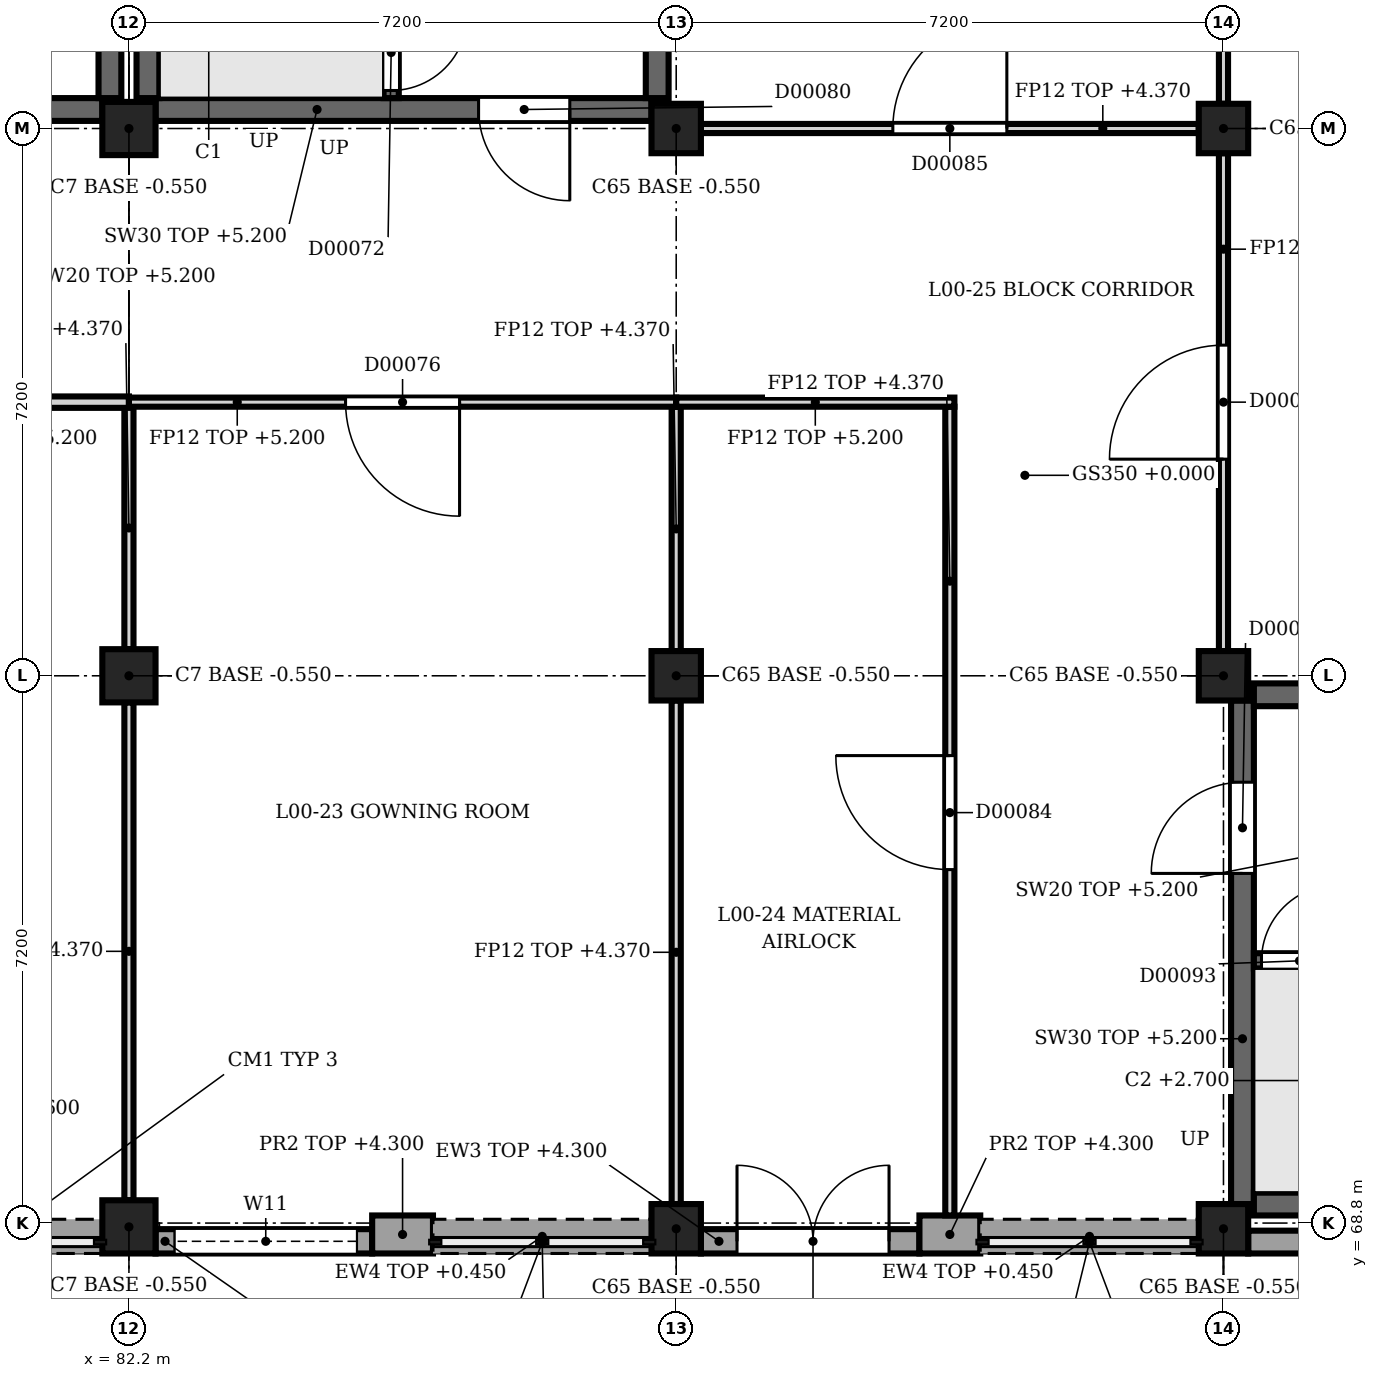
"""IFC4 building model, lengths in metres.
Left out: names, types, materials, properties, quantities, classifications, styles, units other than length and angle.
Written with IfcOpenShell. Run it as: python <this file> out.ifc"""

import sys

from ifc_helpers import new_model, si_unit, direction, frame, frame_2d, origin, origin_2d, place, context, subcontext, project, spatial, rectangle, extrude, element, fill, save


model = new_model("IFC4")
c1 = context("Model", 3, precision=1e-05, world=origin(), true_north=direction((0.0, 1.0)))
c2 = subcontext(c1, "Body", "Model", "MODEL_VIEW")
j1 = project(units=[si_unit("LENGTHUNIT", "METRE"), si_unit("PLANEANGLEUNIT", "RADIAN")], contexts=[c1])
p1 = place(None, origin())
s1 = spatial("IfcSite", under=j1, at=p1, CompositionType="ELEMENT")
p2 = place(p1, origin())
s2 = spatial("IfcBuilding", under=s1, at=p2, CompositionType="ELEMENT")
p3 = place(p2, origin())
s3 = spatial("IfcBuildingStorey", under=s2, at=p3, CompositionType="ELEMENT", Elevation=0.0)
for number, where, z_axis, x_axis in (
    (1, (82.2, 68.75, -0.55), (0.0, 0.0, 1.0), (1.0, 0.0, 0.0)),
    (2, (82.2, 76.0, -0.55), (0.0, 0.0, 1.0), (1.0, 0.0, 0.0)),
    (3, (82.2, 83.2, -0.55), (0.0, 0.0, 1.0), (1.0, 0.0, 0.0)),
):
    element("IfcColumn", number, at=place(p3, frame(where, z_axis=z_axis, x_axis=x_axis)), inside=s3, PredefinedType="COLUMN", context=c2, shape_type="SweptSolid", body=[
        extrude(rectangle(XDim=0.7, YDim=0.7, at=origin_2d()), origin(), (0.0, 0.0, 1.0), 5.95),
    ])
for number, where, z_axis, x_axis in (
    (4, (89.4, 68.725, -0.55), (0.0, 0.0, 1.0), (1.0, 0.0, 0.0)),
    (5, (89.4, 76.0, -0.55), (0.0, 0.0, 1.0), (1.0, 0.0, 0.0)),
    (6, (89.4, 83.2, -0.55), (0.0, 0.0, 1.0), (1.0, 0.0, 0.0)),
    (7, (96.6, 68.725, -0.55), (0.0, 0.0, 1.0), (1.0, 0.0, 0.0)),
    (8, (96.6, 76.0, -0.55), (0.0, 0.0, 1.0), (1.0, 0.0, 0.0)),
    (9, (96.6, 83.2, -0.55), (0.0, 0.0, 1.0), (1.0, 0.0, 0.0)),
):
    element("IfcColumn", number, at=place(p3, frame(where, z_axis=z_axis, x_axis=x_axis)), inside=s3, PredefinedType="COLUMN", context=c2, shape_type="SweptSolid", body=[
        extrude(rectangle(XDim=0.65, YDim=0.65, at=origin_2d()), origin(), (0.0, 0.0, 1.0), 5.95),
    ])
p4 = place(p3, frame((93.4, 68.65, 0.0), z_axis=(0.0, 0.0, 1.0), x_axis=(-1.0, 0.0, 0.0)))
e10 = element("IfcWall", 10, at=p4, inside=s3, PredefinedType="SOLIDWALL", context=c2, shape_type="SweptSolid", body=[
    extrude(rectangle(XDim=0.8, YDim=0.5, at=frame_2d((0.4, 0.0))), origin(), (0.0, 0.0, 1.0), 4.3),
])
p5 = place(p3, frame((86.2, 68.65, 0.0), z_axis=(0.0, 0.0, 1.0), x_axis=(-1.0, 0.0, 0.0)))
e11 = element("IfcWall", 11, at=p5, inside=s3, PredefinedType="SOLIDWALL", context=c2, shape_type="SweptSolid", body=[
    extrude(rectangle(XDim=0.8, YDim=0.5, at=frame_2d((0.4, 0.0))), origin(), (0.0, 0.0, 1.0), 4.3),
])
p6 = place(p3, frame((99.8, 68.55, 0.0), z_axis=(0.0, 0.0, 1.0), x_axis=(-1.0, 0.0, 0.0)))
e12 = element("IfcWall", 12, at=p6, inside=s3, PredefinedType="SOLIDWALL", context=c2, shape_type="SweptSolid", body=[
    extrude(rectangle(XDim=2.875, YDim=0.3, at=frame_2d((1.438, 0.0))), origin(), (0.0, 0.0, 1.0), 4.3),
])
p7 = place(p3, frame((96.275, 68.625, 0.0), z_axis=(0.0, 0.0, 1.0), x_axis=(-1.0, 0.0, 0.0)))
e13 = element("IfcWall", 13, at=p7, inside=s3, PredefinedType="SOLIDWALL", context=c2, shape_type="SweptSolid", body=[
    extrude(rectangle(XDim=2.875, YDim=0.45, at=frame_2d((1.438, 0.0))), origin(), (0.0, 0.0, 1.0), 0.45),
])
p8 = place(p3, frame((92.6, 68.56, 0.0), z_axis=(0.0, 0.0, 1.0), x_axis=(-1.0, 0.0, 0.0)))
e14 = element("IfcWall", 14, at=p8, inside=s3, PredefinedType="SOLIDWALL", context=c2, shape_type="SweptSolid", body=[
    extrude(rectangle(XDim=2.875, YDim=0.32, at=frame_2d((1.438, 0.0))), origin(), (0.0, 0.0, 1.0), 4.3),
])
p9 = place(p8, frame((0.4, 0.0, 0.0)))
e15 = element("IfcOpeningElement", 15, at=p9, cuts=e14, PredefinedType="OPENING", context=c2, shape_type="SweptSolid", body=[
    extrude(rectangle(XDim=2.0, YDim=2.4, at=frame_2d((1.0, 1.2))), frame((0.0, 0.17, 0.0), z_axis=(0.0, -1.0, 0.0), x_axis=(1.0, 0.0, 0.0)), (0.0, 0.0, 1.0), 0.34),
])
p10 = place(p3, frame((89.075, 68.625, 0.0), z_axis=(0.0, 0.0, 1.0), x_axis=(-1.0, 0.0, 0.0)))
e16 = element("IfcWall", 16, at=p10, inside=s3, PredefinedType="SOLIDWALL", context=c2, shape_type="SweptSolid", body=[
    extrude(rectangle(XDim=2.875, YDim=0.45, at=frame_2d((1.438, 0.0))), origin(), (0.0, 0.0, 1.0), 0.45),
])
p11 = place(p3, frame((85.4, 68.56, 0.0), z_axis=(0.0, 0.0, 1.0), x_axis=(-1.0, 0.0, 0.0)))
e17 = element("IfcWall", 17, at=p11, inside=s3, PredefinedType="SOLIDWALL", context=c2, shape_type="SweptSolid", body=[
    extrude(rectangle(XDim=2.85, YDim=0.32, at=frame_2d((1.425, 0.0))), origin(), (0.0, 0.0, 1.0), 4.3),
])
p12 = place(p11, frame((0.2, 0.0, 2.2)))
e18 = element("IfcOpeningElement", 18, at=p12, cuts=e17, PredefinedType="OPENING", context=c2, shape_type="SweptSolid", body=[
    extrude(rectangle(XDim=2.4, YDim=0.9, at=frame_2d((1.2, 0.45))), frame((0.0, 0.17, 0.0), z_axis=(0.0, -1.0, 0.0), x_axis=(1.0, 0.0, 0.0)), (0.0, 0.0, 1.0), 0.34),
])
p13 = place(p3, frame((81.85, 68.625, 0.0), z_axis=(0.0, 0.0, 1.0), x_axis=(-1.0, 0.0, 0.0)))
e19 = element("IfcWall", 19, at=p13, inside=s3, PredefinedType="SOLIDWALL", context=c2, shape_type="SweptSolid", body=[
    extrude(rectangle(XDim=2.85, YDim=0.45, at=frame_2d((1.425, 0.0))), origin(), (0.0, 0.0, 1.0), 0.6),
])
p14 = place(p3, frame((82.55, 83.45, 0.0), z_axis=(0.0, 0.0, 1.0), x_axis=(1.0, 0.0, 0.0)))
e20 = element("IfcWall", 20, at=p14, inside=s3, PredefinedType="SHEAR", context=c2, shape_type="SweptSolid", body=[
    extrude(rectangle(XDim=6.525, YDim=0.3, at=frame_2d((3.262, 0.0))), origin(), (0.0, 0.0, 1.0), 5.2),
])
p15 = place(p14, frame((4.25, 0.0, 0.0)))
e21 = element("IfcOpeningElement", 21, at=p15, cuts=e20, PredefinedType="OPENING", context=c2, shape_type="SweptSolid", body=[
    extrude(rectangle(XDim=1.2, YDim=2.1, at=frame_2d((0.6, 1.05))), frame((0.0, 0.16, 0.0), z_axis=(0.0, -1.0, 0.0), x_axis=(1.0, 0.0, 0.0)), (0.0, 0.0, 1.0), 0.32),
])
for number, where, z_axis, x_axis in (
    (22, (82.45, 83.6, 0.0), (0.0, 0.0, 1.0), (0.0, 1.0, 0.0)),
    (23, (89.15, 83.6, 0.0), (0.0, 0.0, 1.0), (0.0, 1.0, 0.0)),
):
    element("IfcWall", number, at=place(p3, frame(where, z_axis=z_axis, x_axis=x_axis)), inside=s3, PredefinedType="SHEAR", context=c2, shape_type="SweptSolid", body=[
        extrude(rectangle(XDim=6.4, YDim=0.3, at=frame_2d((3.2, 0.0))), origin(), (0.0, 0.0, 1.0), 5.2),
    ])
p16 = place(p3, frame((85.65, 90.0, 0.0), z_axis=(0.0, 0.0, 1.0), x_axis=(0.0, -1.0, 0.0)))
e24 = element("IfcWall", 24, at=p16, inside=s3, PredefinedType="SHEAR", context=c2, shape_type="SweptSolid", body=[
    extrude(rectangle(XDim=6.4, YDim=0.2, at=frame_2d((3.2, 0.0))), origin(), (0.0, 0.0, 1.0), 5.2),
])
p17 = place(p16, frame((5.3, 0.0, 0.0)))
e25 = element("IfcOpeningElement", 25, at=p17, cuts=e24, PredefinedType="OPENING", context=c2, shape_type="SweptSolid", body=[
    extrude(rectangle(XDim=1.0, YDim=2.1, at=frame_2d((0.5, 1.05))), frame((0.0, 0.11, 0.0), z_axis=(0.0, -1.0, 0.0), x_axis=(1.0, 0.0, 0.0)), (0.0, 0.0, 1.0), 0.22),
])
p18 = place(p3, frame((96.85, 75.675, 0.0), z_axis=(0.0, 0.0, 1.0), x_axis=(0.0, -1.0, 0.0)))
e26 = element("IfcWall", 26, at=p18, inside=s3, PredefinedType="SHEAR", context=c2, shape_type="SweptSolid", body=[
    extrude(rectangle(XDim=6.625, YDim=0.3, at=frame_2d((3.312, 0.0))), origin(), (0.0, 0.0, 1.0), 5.2),
])
p19 = place(p18, frame((1.075, 0.0, 0.0)))
e27 = element("IfcOpeningElement", 27, at=p19, cuts=e26, PredefinedType="OPENING", context=c2, shape_type="SweptSolid", body=[
    extrude(rectangle(XDim=1.2, YDim=2.1, at=frame_2d((0.6, 1.05))), frame((0.0, 0.16, 0.0), z_axis=(0.0, -1.0, 0.0), x_axis=(1.0, 0.0, 0.0)), (0.0, 0.0, 1.0), 0.32),
])
for number, where, z_axis, x_axis in (
    (28, (97.0, 69.05, 0.0), (0.0, 0.0, 1.0), (1.0, 0.0, 0.0)),
    (29, (97.0, 75.75, 0.0), (0.0, 0.0, 1.0), (1.0, 0.0, 0.0)),
):
    element("IfcWall", number, at=place(p3, frame(where, z_axis=z_axis, x_axis=x_axis)), inside=s3, PredefinedType="SHEAR", context=c2, shape_type="SweptSolid", body=[
        extrude(rectangle(XDim=6.4, YDim=0.3, at=frame_2d((3.2, 0.0))), origin(), (0.0, 0.0, 1.0), 5.2),
    ])
p20 = place(p3, frame((97.0, 72.25, 0.0), z_axis=(0.0, 0.0, 1.0), x_axis=(1.0, 0.0, 0.0)))
e30 = element("IfcWall", 30, at=p20, inside=s3, PredefinedType="SHEAR", context=c2, shape_type="SweptSolid", body=[
    extrude(rectangle(XDim=6.4, YDim=0.2, at=frame_2d((3.2, 0.0))), origin(), (0.0, 0.0, 1.0), 5.2),
])
p21 = place(p20, frame((0.1, 0.0, 0.0)))
e31 = element("IfcOpeningElement", 31, at=p21, cuts=e30, PredefinedType="OPENING", context=c2, shape_type="SweptSolid", body=[
    extrude(rectangle(XDim=1.0, YDim=2.1, at=frame_2d((0.5, 1.05))), frame((0.0, 0.11, 0.0), z_axis=(0.0, -1.0, 0.0), x_axis=(1.0, 0.0, 0.0)), (0.0, 0.0, 1.0), 0.22),
])
p22 = place(p3, frame((75.35, 83.45, 0.0), z_axis=(0.0, 0.0, 1.0), x_axis=(1.0, 0.0, 0.0)))
e32 = element("IfcWall", 32, at=p22, inside=s3, PredefinedType="SHEAR", context=c2, shape_type="SweptSolid", body=[
    extrude(rectangle(XDim=6.5, YDim=0.3, at=frame_2d((3.25, 0.0))), origin(), (0.0, 0.0, 1.0), 5.2),
])
p23 = place(p22, frame((4.25, 0.0, 0.0)))
e33 = element("IfcOpeningElement", 33, at=p23, cuts=e32, PredefinedType="OPENING", context=c2, shape_type="SweptSolid", body=[
    extrude(rectangle(XDim=1.2, YDim=2.1, at=frame_2d((0.6, 1.05))), frame((0.0, 0.16, 0.0), z_axis=(0.0, -1.0, 0.0), x_axis=(1.0, 0.0, 0.0)), (0.0, 0.0, 1.0), 0.32),
])
p24 = place(p3, frame((81.95, 83.6, 0.0), z_axis=(0.0, 0.0, 1.0), x_axis=(0.0, 1.0, 0.0)))
e34 = element("IfcWall", 34, at=p24, inside=s3, PredefinedType="SHEAR", context=c2, shape_type="SweptSolid", body=[
    extrude(rectangle(XDim=6.4, YDim=0.3, at=frame_2d((3.2, 0.0))), origin(), (0.0, 0.0, 1.0), 5.2),
])
p25 = place(p3, frame((82.2, 79.6, 0.0), z_axis=(0.0, 0.0, 1.0), x_axis=(-1.0, 0.0, 0.0)))
e35 = element("IfcWall", 35, at=p25, inside=s3, PredefinedType="PARTITIONING", context=c2, shape_type="SweptSolid", body=[
    extrude(rectangle(XDim=7.2, YDim=0.15, at=frame_2d((3.6, 0.0))), origin(), (0.0, 0.0, 1.0), 5.2),
])
p26 = place(p25, frame((3.15, 0.0, 0.0)))
e36 = element("IfcOpeningElement", 36, at=p26, cuts=e35, PredefinedType="OPENING", context=c2, shape_type="SweptSolid", body=[
    extrude(rectangle(XDim=1.0, YDim=2.1, at=frame_2d((0.5, 1.05))), frame((0.0, 0.085, 0.0), z_axis=(0.0, -1.0, 0.0), x_axis=(1.0, 0.0, 0.0)), (0.0, 0.0, 1.0), 0.17),
])
p27 = place(p3, frame((89.4, 79.6, 0.0), z_axis=(0.0, 0.0, 1.0), x_axis=(-1.0, 0.0, 0.0)))
e37 = element("IfcWall", 37, at=p27, inside=s3, PredefinedType="PARTITIONING", context=c2, shape_type="SweptSolid", body=[
    extrude(rectangle(XDim=7.2, YDim=0.12, at=frame_2d((3.6, 0.0))), origin(), (0.0, 0.0, 1.0), 5.2),
])
p28 = place(p27, frame((2.85, 0.0, 0.0)))
e38 = element("IfcOpeningElement", 38, at=p28, cuts=e37, PredefinedType="OPENING", context=c2, shape_type="SweptSolid", body=[
    extrude(rectangle(XDim=1.5, YDim=2.1, at=frame_2d((0.75, 1.05))), frame((0.0, 0.07, 0.0), z_axis=(0.0, -1.0, 0.0), x_axis=(1.0, 0.0, 0.0)), (0.0, 0.0, 1.0), 0.14),
])
p29 = place(p3, frame((89.4, 79.6, 0.0), z_axis=(0.0, 0.0, 1.0), x_axis=(1.0, 0.0, 0.0)))
e39 = element("IfcWall", 39, at=p29, inside=s3, PredefinedType="PARTITIONING", context=c2, shape_type="SweptSolid", body=[
    extrude(rectangle(XDim=3.66, YDim=0.12, at=frame_2d((1.83, 0.0))), origin(), (0.0, 0.0, 1.0), 5.2),
])
p30 = place(p3, frame((89.725, 83.2, 0.0), z_axis=(0.0, 0.0, 1.0), x_axis=(1.0, 0.0, 0.0)))
e40 = element("IfcWall", 40, at=p30, inside=s3, PredefinedType="PARTITIONING", context=c2, shape_type="SweptSolid", body=[
    extrude(rectangle(XDim=6.55, YDim=0.12, at=frame_2d((3.275, 0.0))), origin(), (0.0, 0.0, 1.0), 4.37),
])
p31 = place(p30, frame((2.525, 0.0, 0.0)))
e41 = element("IfcOpeningElement", 41, at=p31, cuts=e40, PredefinedType="OPENING", context=c2, shape_type="SweptSolid", body=[
    extrude(rectangle(XDim=1.5, YDim=2.2, at=frame_2d((0.75, 1.1))), frame((0.0, 0.07, 0.0), z_axis=(0.0, -1.0, 0.0), x_axis=(1.0, 0.0, 0.0)), (0.0, 0.0, 1.0), 0.14),
])
p32 = place(p3, frame((82.2, 69.1, 0.0), z_axis=(0.0, 0.0, 1.0), x_axis=(0.0, 1.0, 0.0)))
e42 = element("IfcWall", 42, at=p32, inside=s3, PredefinedType="PARTITIONING", context=c2, shape_type="SweptSolid", body=[
    extrude(rectangle(XDim=6.55, YDim=0.12, at=frame_2d((3.275, 0.0))), origin(), (0.0, 0.0, 1.0), 4.37),
])
p33 = place(p3, frame((82.2, 76.35, 0.0), z_axis=(0.0, 0.0, 1.0), x_axis=(0.0, 1.0, 0.0)))
e43 = element("IfcWall", 43, at=p33, inside=s3, PredefinedType="PARTITIONING", context=c2, shape_type="SweptSolid", body=[
    extrude(rectangle(XDim=3.19, YDim=0.12, at=frame_2d((1.595, 0.0))), origin(), (0.0, 0.0, 1.0), 4.37),
])
p34 = place(p3, frame((89.4, 69.05, 0.0), z_axis=(0.0, 0.0, 1.0), x_axis=(0.0, 1.0, 0.0)))
e44 = element("IfcWall", 44, at=p34, inside=s3, PredefinedType="PARTITIONING", context=c2, shape_type="SweptSolid", body=[
    extrude(rectangle(XDim=6.625, YDim=0.12, at=frame_2d((3.312, 0.0))), origin(), (0.0, 0.0, 1.0), 4.37),
])
p35 = place(p3, frame((89.4, 76.325, 0.0), z_axis=(0.0, 0.0, 1.0), x_axis=(0.0, 1.0, 0.0)))
e45 = element("IfcWall", 45, at=p35, inside=s3, PredefinedType="PARTITIONING", context=c2, shape_type="SweptSolid", body=[
    extrude(rectangle(XDim=3.215, YDim=0.12, at=frame_2d((1.607, 0.0))), origin(), (0.0, 0.0, 1.0), 4.37),
])
p36 = place(p3, frame((93.0, 68.9, 0.0), z_axis=(0.0, 0.0, 1.0), x_axis=(0.0, 1.0, 0.0)))
e46 = element("IfcWall", 46, at=p36, inside=s3, PredefinedType="PARTITIONING", context=c2, shape_type="SweptSolid", body=[
    extrude(rectangle(XDim=10.64, YDim=0.12, at=frame_2d((5.32, 0.0))), origin(), (0.0, 0.0, 1.0), 4.37),
])
p37 = place(p36, frame((4.55, 0.0, 0.0)))
e47 = element("IfcOpeningElement", 47, at=p37, cuts=e46, PredefinedType="OPENING", context=c2, shape_type="SweptSolid", body=[
    extrude(rectangle(XDim=1.5, YDim=2.1, at=frame_2d((0.75, 1.05))), frame((0.0, 0.07, 0.0), z_axis=(0.0, -1.0, 0.0), x_axis=(1.0, 0.0, 0.0)), (0.0, 0.0, 1.0), 0.14),
])
p38 = place(p3, frame((96.6, 82.875, 0.0), z_axis=(0.0, 0.0, 1.0), x_axis=(0.0, -1.0, 0.0)))
e48 = element("IfcWall", 48, at=p38, inside=s3, PredefinedType="PARTITIONING", context=c2, shape_type="SweptSolid", body=[
    extrude(rectangle(XDim=6.55, YDim=0.12, at=frame_2d((3.275, 0.0))), origin(), (0.0, 0.0, 1.0), 4.37),
])
p39 = place(p38, frame((2.525, 0.0, 0.0)))
e49 = element("IfcOpeningElement", 49, at=p39, cuts=e48, PredefinedType="OPENING", context=c2, shape_type="SweptSolid", body=[
    extrude(rectangle(XDim=1.5, YDim=2.2, at=frame_2d((0.75, 1.1))), frame((0.0, 0.07, 0.0), z_axis=(0.0, -1.0, 0.0), x_axis=(1.0, 0.0, 0.0)), (0.0, 0.0, 1.0), 0.14),
])
p40 = place(p3, frame((96.6, 83.525, 0.0), z_axis=(0.0, 0.0, 1.0), x_axis=(0.0, 1.0, 0.0)))
e50 = element("IfcWall", 50, at=p40, inside=s3, PredefinedType="PARTITIONING", context=c2, shape_type="SweptSolid", body=[
    extrude(rectangle(XDim=6.625, YDim=0.12, at=frame_2d((3.312, 0.0))), origin(), (0.0, 0.0, 1.0), 4.37),
])
p41 = place(p9, origin())
e51 = element("IfcDoor", 51, at=p41, inside=s3, OperationType="SINGLE_SWING_LEFT", PredefinedType="DOOR", context=c2, shape_type="SweptSolid", body=[
    extrude(rectangle(XDim=2.0, YDim=2.4, at=frame_2d((1.0, 1.2))), frame((0.0, 0.025, 0.0), z_axis=(0.0, -1.0, 0.0), x_axis=(1.0, 0.0, 0.0)), (0.0, 0.0, 1.0), 0.05),
])
fill(e15, e51)
p42 = place(p12, origin())
e52 = element("IfcWindow", 52, at=p42, inside=s3, PartitioningType="SINGLE_PANEL", PredefinedType="WINDOW", context=c2, shape_type="SweptSolid", body=[
    extrude(rectangle(XDim=2.4, YDim=0.9, at=frame_2d((1.2, 0.45))), frame((0.0, 0.03, 0.0), z_axis=(0.0, -1.0, 0.0), x_axis=(1.0, 0.0, 0.0)), (0.0, 0.0, 1.0), 0.06),
])
fill(e18, e52)
p43 = place(p15, origin())
e53 = element("IfcDoor", 53, at=p43, inside=s3, OperationType="SINGLE_SWING_RIGHT", PredefinedType="DOOR", context=c2, shape_type="SweptSolid", body=[
    extrude(rectangle(XDim=1.2, YDim=2.1, at=frame_2d((0.6, 1.05))), frame((0.0, 0.025, 0.0), z_axis=(0.0, -1.0, 0.0), x_axis=(1.0, 0.0, 0.0)), (0.0, 0.0, 1.0), 0.05),
])
fill(e21, e53)
p44 = place(p17, origin())
e54 = element("IfcDoor", 54, at=p44, inside=s3, OperationType="SINGLE_SWING_RIGHT", PredefinedType="DOOR", context=c2, shape_type="SweptSolid", body=[
    extrude(rectangle(XDim=1.0, YDim=2.1, at=frame_2d((0.5, 1.05))), frame((0.0, 0.025, 0.0), z_axis=(0.0, -1.0, 0.0), x_axis=(1.0, 0.0, 0.0)), (0.0, 0.0, 1.0), 0.05),
])
fill(e25, e54)
p45 = place(p19, origin())
e55 = element("IfcDoor", 55, at=p45, inside=s3, OperationType="SINGLE_SWING_LEFT", PredefinedType="DOOR", context=c2, shape_type="SweptSolid", body=[
    extrude(rectangle(XDim=1.2, YDim=2.1, at=frame_2d((0.6, 1.05))), frame((0.0, 0.025, 0.0), z_axis=(0.0, -1.0, 0.0), x_axis=(1.0, 0.0, 0.0)), (0.0, 0.0, 1.0), 0.05),
])
fill(e27, e55)
p46 = place(p21, origin())
e56 = element("IfcDoor", 56, at=p46, inside=s3, OperationType="SINGLE_SWING_LEFT", PredefinedType="DOOR", context=c2, shape_type="SweptSolid", body=[
    extrude(rectangle(XDim=1.0, YDim=2.1, at=frame_2d((0.5, 1.05))), frame((0.0, 0.025, 0.0), z_axis=(0.0, -1.0, 0.0), x_axis=(1.0, 0.0, 0.0)), (0.0, 0.0, 1.0), 0.05),
])
fill(e31, e56)
p47 = place(p28, origin())
e57 = element("IfcDoor", 57, at=p47, inside=s3, OperationType="SINGLE_SWING_RIGHT", PredefinedType="DOOR", context=c2, shape_type="SweptSolid", body=[
    extrude(rectangle(XDim=1.5, YDim=2.1, at=frame_2d((0.75, 1.05))), frame((0.0, 0.025, 0.0), z_axis=(0.0, -1.0, 0.0), x_axis=(1.0, 0.0, 0.0)), (0.0, 0.0, 1.0), 0.05),
])
fill(e38, e57)
p48 = place(p31, origin())
e58 = element("IfcDoor", 58, at=p48, inside=s3, OperationType="SINGLE_SWING_LEFT", PredefinedType="DOOR", context=c2, shape_type="SweptSolid", body=[
    extrude(rectangle(XDim=1.5, YDim=2.2, at=frame_2d((0.75, 1.1))), frame((0.0, 0.025, 0.0), z_axis=(0.0, -1.0, 0.0), x_axis=(1.0, 0.0, 0.0)), (0.0, 0.0, 1.0), 0.05),
])
fill(e41, e58)
p49 = place(p37, origin())
e59 = element("IfcDoor", 59, at=p49, inside=s3, OperationType="SINGLE_SWING_LEFT", PredefinedType="DOOR", context=c2, shape_type="SweptSolid", body=[
    extrude(rectangle(XDim=1.5, YDim=2.1, at=frame_2d((0.75, 1.05))), frame((0.0, 0.025, 0.0), z_axis=(0.0, -1.0, 0.0), x_axis=(1.0, 0.0, 0.0)), (0.0, 0.0, 1.0), 0.05),
])
fill(e47, e59)
p50 = place(p39, origin())
e60 = element("IfcDoor", 60, at=p50, inside=s3, OperationType="SINGLE_SWING_RIGHT", PredefinedType="DOOR", context=c2, shape_type="SweptSolid", body=[
    extrude(rectangle(XDim=1.5, YDim=2.2, at=frame_2d((0.75, 1.1))), frame((0.0, 0.025, 0.0), z_axis=(0.0, -1.0, 0.0), x_axis=(1.0, 0.0, 0.0)), (0.0, 0.0, 1.0), 0.05),
])
fill(e49, e60)
save(model, sys.argv[1])
